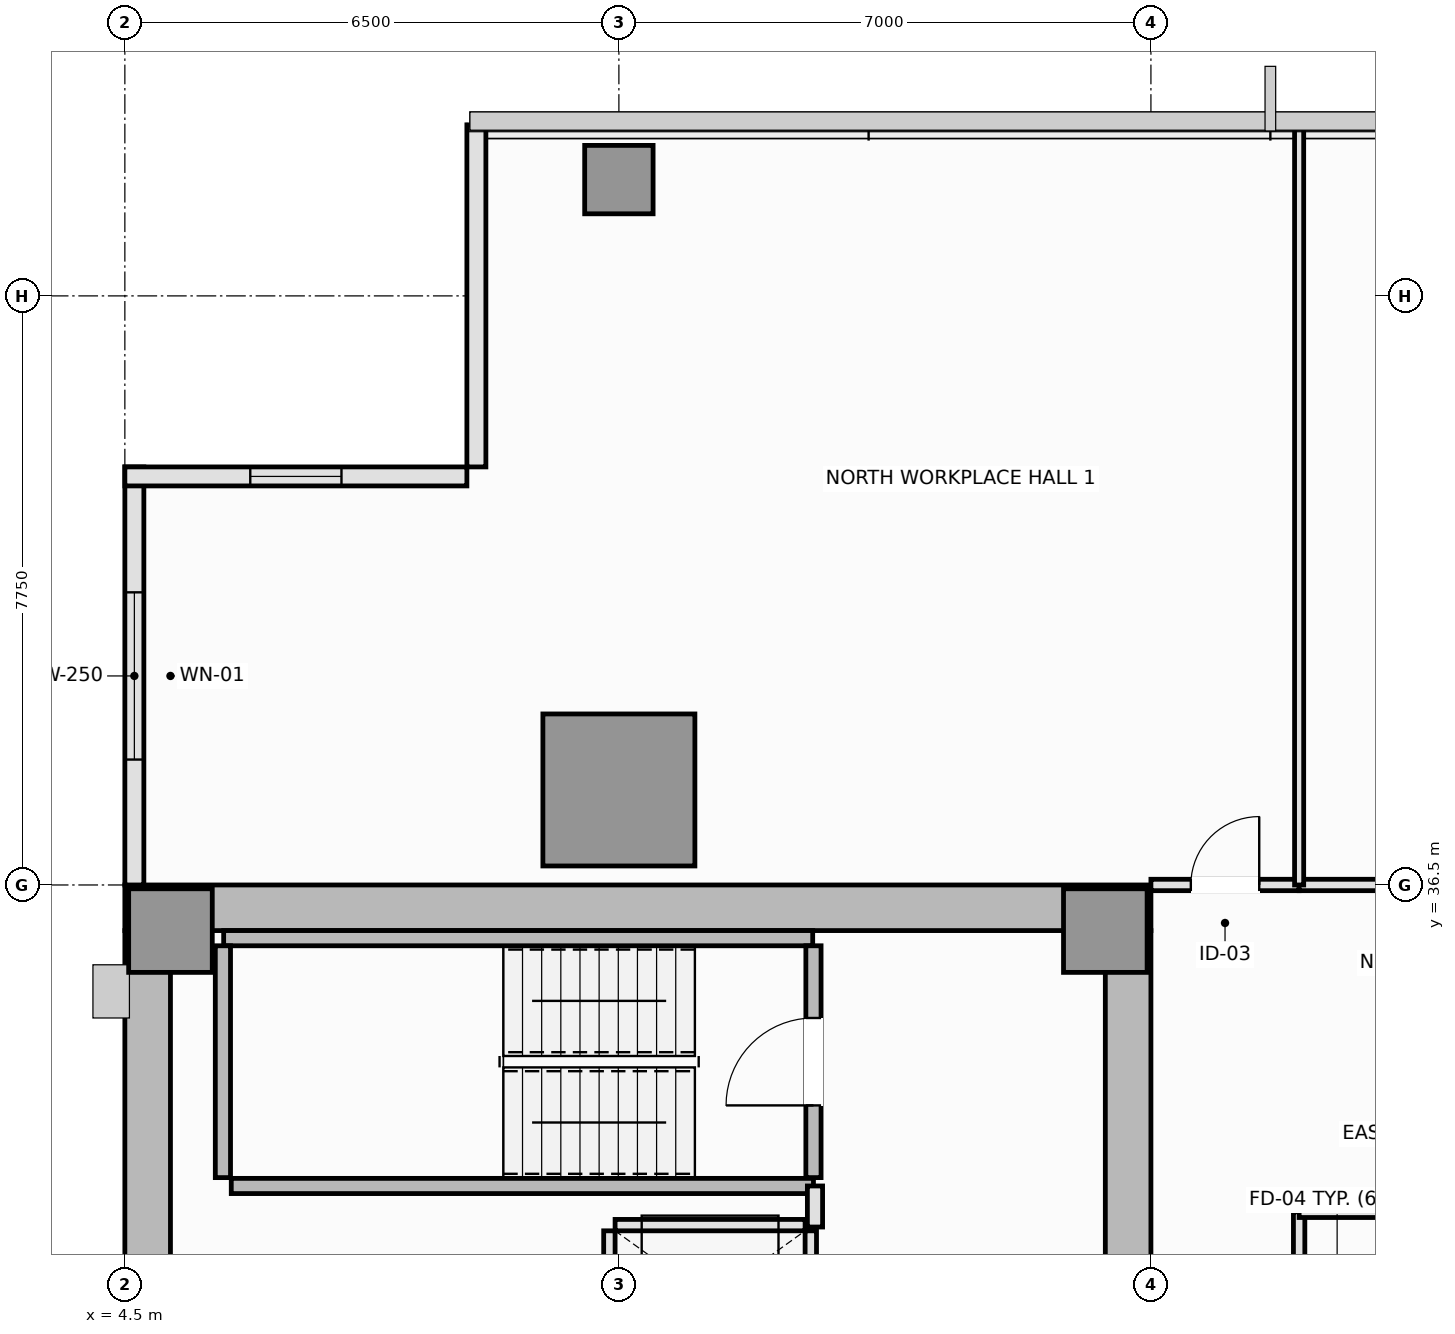
"""IFC4 building model, lengths in metres.
Left out: names, types, materials, properties, quantities, classifications, styles, units other than length and angle.
Written with IfcOpenShell. Run it as: python <this file> out.ifc"""

import sys

from ifc_helpers import new_model, si_unit, direction, frame, frame_2d, origin, origin_2d, place, context, subcontext, project, spatial, rectangle, extrude, element, fill, save


model = new_model("IFC4")
c1 = context("Model", 3, precision=1e-05, world=origin(), true_north=direction((0.0, 1.0)))
c2 = subcontext(c1, "Body", "Model", "MODEL_VIEW")
j1 = project(units=[si_unit("LENGTHUNIT", "METRE"), si_unit("PLANEANGLEUNIT", "RADIAN")], contexts=[c1])
p1 = place(None, origin())
s1 = spatial("IfcSite", under=j1, at=p1, CompositionType="ELEMENT")
p2 = place(p1, origin())
s2 = spatial("IfcBuilding", under=s1, at=p2, CompositionType="ELEMENT")
p3 = place(p2, frame((0.0, 0.0, 116.45)))
s3 = spatial("IfcBuildingStorey", under=s2, at=p3, CompositionType="ELEMENT", Elevation=116.45)
p4 = place(p3, frame((4.5, 36.2, 0.0), z_axis=(0.0, 0.0, 1.0), x_axis=(1.0, 0.0, 0.0)))
e1 = element("IfcWall", 1, at=p4, inside=s3, PredefinedType="SHEAR", context=c2, shape_type="SweptSolid", body=[
    extrude(rectangle(XDim=13.5, YDim=0.6, at=frame_2d((6.75, 0.0))), origin(), (0.0, 0.0, 1.0), 3.55),
])
p5 = place(p3, frame((4.8, 14.6, 0.0), z_axis=(0.0, 0.0, 1.0), x_axis=(0.0, 1.0, 0.0)))
e2 = element("IfcWall", 2, at=p5, inside=s3, PredefinedType="SHEAR", context=c2, shape_type="SweptSolid", body=[
    extrude(rectangle(XDim=21.3, YDim=0.6, at=frame_2d((10.65, 0.0))), origin(), (0.0, 0.0, 1.0), 3.55),
])
p6 = place(p3, frame((17.7, 27.05, 0.0), z_axis=(0.0, 0.0, 1.0), x_axis=(0.0, 1.0, 0.0)))
e3 = element("IfcWall", 3, at=p6, inside=s3, PredefinedType="SHEAR", context=c2, shape_type="SweptSolid", body=[
    extrude(rectangle(XDim=8.85, YDim=0.6, at=frame_2d((4.425, 0.0))), origin(), (0.0, 0.0, 1.0), 3.55),
])
p7 = place(p6, frame((3.45, 0.0, 0.0)))
e4 = element("IfcOpeningElement", 4, at=p7, cuts=e3, PredefinedType="OPENING", context=c2, shape_type="SweptSolid", body=[
    extrude(rectangle(XDim=1.1, YDim=2.15, at=frame_2d((0.55, 1.075))), frame((0.0, 0.31, 0.0), z_axis=(0.0, -1.0, 0.0), x_axis=(1.0, 0.0, 0.0)), (0.0, 0.0, 1.0), 0.62),
])
for number, where, z_axis, x_axis in (
    (5, (5.1, 35.9, 0.0), (0.0, 0.0, 1.0), (1.0, 0.0, 0.0)),
    (6, (17.4, 35.9, 0.0), (0.0, 0.0, 1.0), (1.0, 0.0, 0.0)),
):
    element("IfcColumn", number, at=place(p3, frame(where, z_axis=z_axis, x_axis=x_axis)), inside=s3, PredefinedType="PILASTER", context=c2, shape_type="SweptSolid", body=[
        extrude(rectangle(XDim=1.1, YDim=1.1, at=origin_2d()), origin(), (0.0, 0.0, 1.0), 3.55),
    ])
p8 = place(p3, frame((11.0, 37.75, 0.0), z_axis=(0.0, 0.0, 1.0), x_axis=(1.0, 0.0, 0.0)))
e7 = element("IfcColumn", 7, at=p8, inside=s3, PredefinedType="COLUMN", context=c2, shape_type="SweptSolid", body=[
    extrude(rectangle(XDim=2.0, YDim=2.0, at=origin_2d()), origin(), (0.0, 0.0, 1.0), 3.55),
])
p9 = place(p3, frame((11.0, 45.78, 0.0), z_axis=(0.0, 0.0, 1.0), x_axis=(1.0, 0.0, 0.0)))
e8 = element("IfcColumn", 8, at=p9, inside=s3, PredefinedType="COLUMN", context=c2, shape_type="SweptSolid", body=[
    extrude(rectangle(XDim=0.9, YDim=0.9, at=origin_2d()), origin(), (0.0, 0.0, 1.0), 3.55),
])
p10 = place(p3, frame((4.625, 42.0, 0.0), z_axis=(0.0, 0.0, 1.0), x_axis=(0.0, -1.0, 0.0)))
e9 = element("IfcWall", 9, at=p10, inside=s3, PredefinedType="SOLIDWALL", context=c2, shape_type="SweptSolid", body=[
    extrude(rectangle(XDim=5.5, YDim=0.25, at=frame_2d((2.75, 0.0))), origin(), (0.0, 0.0, 1.0), 3.37),
])
p11 = place(p10, frame((1.65, 0.0, 0.9)))
e10 = element("IfcOpeningElement", 10, at=p11, cuts=e9, PredefinedType="OPENING", context=c2, shape_type="SweptSolid", body=[
    extrude(rectangle(XDim=2.2, YDim=1.8, at=frame_2d((1.1, 0.9))), frame((0.0, 0.135, 0.0), z_axis=(0.0, -1.0, 0.0), x_axis=(1.0, 0.0, 0.0)), (0.0, 0.0, 1.0), 0.27),
])
p12 = place(p3, frame((9.125, 46.5, 0.0), z_axis=(0.0, 0.0, 1.0), x_axis=(0.0, -1.0, 0.0)))
e11 = element("IfcWall", 11, at=p12, inside=s3, PredefinedType="SOLIDWALL", context=c2, shape_type="SweptSolid", body=[
    extrude(rectangle(XDim=4.5, YDim=0.25, at=frame_2d((2.25, 0.0))), origin(), (0.0, 0.0, 1.0), 3.37),
])
p13 = place(p3, frame((9.0, 41.875, 0.0), z_axis=(0.0, 0.0, 1.0), x_axis=(-1.0, 0.0, 0.0)))
e12 = element("IfcWall", 12, at=p13, inside=s3, PredefinedType="SOLIDWALL", context=c2, shape_type="SweptSolid", body=[
    extrude(rectangle(XDim=4.5, YDim=0.25, at=frame_2d((2.25, 0.0))), origin(), (0.0, 0.0, 1.0), 3.37),
])
p14 = place(p13, frame((1.65, 0.0, 0.9)))
e13 = element("IfcOpeningElement", 13, at=p14, cuts=e12, PredefinedType="OPENING", context=c2, shape_type="SweptSolid", body=[
    extrude(rectangle(XDim=1.2, YDim=1.8, at=frame_2d((0.6, 0.9))), frame((0.0, 0.135, 0.0), z_axis=(0.0, -1.0, 0.0), x_axis=(1.0, 0.0, 0.0)), (0.0, 0.0, 1.0), 0.27),
])
p15 = place(p3, frame((5.8, 35.8, 0.0), z_axis=(0.0, 0.0, 1.0), x_axis=(1.0, 0.0, 0.0)))
e14 = element("IfcWall", 14, at=p15, inside=s3, PredefinedType="SOLIDWALL", context=c2, shape_type="SweptSolid", body=[
    extrude(rectangle(XDim=7.75, YDim=0.2, at=frame_2d((3.875, 0.0))), origin(), (0.0, 0.0, 1.0), 3.55),
])
p16 = place(p3, frame((5.79, 32.65, 0.0), z_axis=(0.0, 0.0, 1.0), x_axis=(0.0, 1.0, 0.0)))
e15 = element("IfcWall", 15, at=p16, inside=s3, PredefinedType="SOLIDWALL", context=c2, shape_type="SweptSolid", body=[
    extrude(rectangle(XDim=3.05, YDim=0.2, at=frame_2d((1.525, 0.0))), origin(), (0.0, 0.0, 1.0), 3.55),
])
p17 = place(p3, frame((5.9, 32.54, 0.0), z_axis=(0.0, 0.0, 1.0), x_axis=(1.0, 0.0, 0.0)))
e16 = element("IfcWall", 16, at=p17, inside=s3, PredefinedType="SOLIDWALL", context=c2, shape_type="SweptSolid", body=[
    extrude(rectangle(XDim=7.66, YDim=0.2, at=frame_2d((3.83, 0.0))), origin(), (0.0, 0.0, 1.0), 3.55),
])
p18 = place(p3, frame((13.56, 32.65, 0.0), z_axis=(0.0, 0.0, 1.0), x_axis=(0.0, 1.0, 0.0)))
e17 = element("IfcWall", 17, at=p18, inside=s3, PredefinedType="SOLIDWALL", context=c2, shape_type="SweptSolid", body=[
    extrude(rectangle(XDim=3.05, YDim=0.2, at=frame_2d((1.525, 0.0))), origin(), (0.0, 0.0, 1.0), 3.55),
])
p19 = place(p18, frame((0.95, 0.0, 0.0)))
e18 = element("IfcOpeningElement", 18, at=p19, cuts=e17, PredefinedType="OPENING", context=c2, shape_type="SweptSolid", body=[
    extrude(rectangle(XDim=1.15, YDim=2.15, at=frame_2d((0.575, 1.075))), frame((0.0, 0.11, 0.0), z_axis=(0.0, -1.0, 0.0), x_axis=(1.0, 0.0, 0.0)), (0.0, 0.0, 1.0), 0.22),
])
p20 = place(p3, frame((10.95, 32.025, 0.0), z_axis=(0.0, 0.0, 1.0), x_axis=(1.0, 0.0, 0.0)))
e19 = element("IfcWall", 19, at=p20, inside=s3, PredefinedType="PARTITIONING", context=c2, shape_type="SweptSolid", body=[
    extrude(rectangle(XDim=2.5, YDim=0.15, at=frame_2d((1.25, 0.0))), origin(), (0.0, 0.0, 1.0), 3.37),
])
p21 = place(p3, frame((10.875, 30.15, 0.0), z_axis=(0.0, 0.0, 1.0), x_axis=(0.0, 1.0, 0.0)))
e20 = element("IfcWall", 20, at=p21, inside=s3, PredefinedType="PARTITIONING", context=c2, shape_type="SweptSolid", body=[
    extrude(rectangle(XDim=1.8, YDim=0.15, at=frame_2d((0.9, 0.0))), origin(), (0.0, 0.0, 1.0), 3.37),
])
p22 = place(p3, frame((13.525, 30.15, 0.0), z_axis=(0.0, 0.0, 1.0), x_axis=(0.0, 1.0, 0.0)))
e21 = element("IfcWall", 21, at=p22, inside=s3, PredefinedType="PARTITIONING", context=c2, shape_type="SweptSolid", body=[
    extrude(rectangle(XDim=1.8, YDim=0.15, at=frame_2d((0.9, 0.0))), origin(), (0.0, 0.0, 1.0), 3.37),
])
p23 = place(p22, frame((0.35, 0.0, 0.0)))
e22 = element("IfcOpeningElement", 22, at=p23, cuts=e21, PredefinedType="OPENING", context=c2, shape_type="SweptSolid", body=[
    extrude(rectangle(XDim=1.1, YDim=2.2, at=frame_2d((0.55, 1.1))), frame((0.0, 0.085, 0.0), z_axis=(0.0, -1.0, 0.0), x_axis=(1.0, 0.0, 0.0)), (0.0, 0.0, 1.0), 0.17),
])
p24 = place(p3, frame((13.58, 32.0, 0.0), z_axis=(0.0, 0.0, 1.0), x_axis=(0.0, 1.0, 0.0)))
e23 = element("IfcWall", 23, at=p24, inside=s3, PredefinedType="PARTITIONING", context=c2, shape_type="SweptSolid", body=[
    extrude(rectangle(XDim=0.54, YDim=0.2, at=frame_2d((0.27, 0.0))), origin(), (0.0, 0.0, 1.0), 3.37),
])
p25 = place(p3, frame((19.95, 29.2, 0.0), z_axis=(0.0, 0.0, 1.0), x_axis=(0.0, 1.0, 0.0)))
e24 = element("IfcWall", 24, at=p25, inside=s3, PredefinedType="PLUMBINGWALL", context=c2, shape_type="SweptSolid", body=[
    extrude(rectangle(XDim=3.0, YDim=0.15, at=frame_2d((1.5, 0.0))), origin(), (0.0, 0.0, 1.0), 3.37),
])
p26 = place(p25, frame((1.05, 0.0, 0.0)))
e25 = element("IfcOpeningElement", 25, at=p26, cuts=e24, PredefinedType="OPENING", context=c2, shape_type="SweptSolid", body=[
    extrude(rectangle(XDim=0.9, YDim=2.1, at=frame_2d((0.45, 1.05))), frame((0.0, 0.085, 0.0), z_axis=(0.0, -1.0, 0.0), x_axis=(1.0, 0.0, 0.0)), (0.0, 0.0, 1.0), 0.17),
])
p27 = place(p3, frame((18.0, 36.5, 0.0), z_axis=(0.0, 0.0, 1.0), x_axis=(1.0, 0.0, 0.0)))
e26 = element("IfcWall", 26, at=p27, inside=s3, PredefinedType="PARTITIONING", context=c2, shape_type="SweptSolid", body=[
    extrude(rectangle(XDim=1.95, YDim=0.15, at=frame_2d((0.975, 0.0))), origin(), (0.0, 0.0, 1.0), 3.37),
])
p28 = place(p27, frame((0.525, 0.0, 0.0)))
e27 = element("IfcOpeningElement", 27, at=p28, cuts=e26, PredefinedType="OPENING", context=c2, shape_type="SweptSolid", body=[
    extrude(rectangle(XDim=0.9, YDim=2.1, at=frame_2d((0.45, 1.05))), frame((0.0, 0.085, 0.0), z_axis=(0.0, -1.0, 0.0), x_axis=(1.0, 0.0, 0.0)), (0.0, 0.0, 1.0), 0.17),
])
p29 = place(p3, frame((19.95, 32.2, 0.0), z_axis=(0.0, 0.0, 1.0), x_axis=(1.0, 0.0, 0.0)))
e28 = element("IfcWall", 28, at=p29, inside=s3, PredefinedType="PLUMBINGWALL", context=c2, shape_type="SweptSolid", body=[
    extrude(rectangle(XDim=3.25, YDim=0.15, at=frame_2d((1.625, 0.0))), origin(), (0.0, 0.0, 1.0), 3.37),
])
p30 = place(p3, frame((19.95, 36.5, 0.0), z_axis=(0.0, 0.0, 1.0), x_axis=(1.0, 0.0, 0.0)))
e29 = element("IfcWall", 29, at=p30, inside=s3, PredefinedType="PARTITIONING", context=c2, shape_type="SweptSolid", body=[
    extrude(rectangle(XDim=7.55, YDim=0.15, at=frame_2d((3.775, 0.0))), origin(), (0.0, 0.0, 1.0), 3.37),
])
p31 = place(p30, frame((3.275, 0.0, 0.0)))
e30 = element("IfcOpeningElement", 30, at=p31, cuts=e29, PredefinedType="OPENING", context=c2, shape_type="SweptSolid", body=[
    extrude(rectangle(XDim=1.0, YDim=2.15, at=frame_2d((0.5, 1.075))), frame((0.0, 0.085, 0.0), z_axis=(0.0, -1.0, 0.0), x_axis=(1.0, 0.0, 0.0)), (0.0, 0.0, 1.0), 0.17),
])
p32 = place(p3, frame((19.95, 36.5, 0.0), z_axis=(0.0, 0.0, 1.0), x_axis=(0.0, 1.0, 0.0)))
e31 = element("IfcWall", 31, at=p32, inside=s3, PredefinedType="PARTITIONING", context=c2, shape_type="SweptSolid", body=[
    extrude(rectangle(XDim=9.99, YDim=0.12, at=frame_2d((4.995, 0.0))), origin(), (0.0, 0.0, 1.0), 3.37),
])
p33 = place(p11, origin())
e32 = element("IfcWindow", 32, at=p33, inside=s3, PartitioningType="SINGLE_PANEL", PredefinedType="WINDOW", context=c2, shape_type="SweptSolid", body=[
    extrude(rectangle(XDim=2.2, YDim=1.8, at=frame_2d((1.1, 0.9))), frame((0.0, 0.03, 0.0), z_axis=(0.0, -1.0, 0.0), x_axis=(1.0, 0.0, 0.0)), (0.0, 0.0, 1.0), 0.06),
])
fill(e10, e32)
p34 = place(p14, origin())
e33 = element("IfcWindow", 33, at=p34, inside=s3, PartitioningType="SINGLE_PANEL", PredefinedType="WINDOW", context=c2, shape_type="SweptSolid", body=[
    extrude(rectangle(XDim=1.2, YDim=1.8, at=frame_2d((0.6, 0.9))), frame((0.0, 0.03, 0.0), z_axis=(0.0, -1.0, 0.0), x_axis=(1.0, 0.0, 0.0)), (0.0, 0.0, 1.0), 0.06),
])
fill(e13, e33)
p35 = place(p19, origin())
e34 = element("IfcDoor", 34, at=p35, inside=s3, OperationType="SINGLE_SWING_LEFT", PredefinedType="DOOR", context=c2, shape_type="SweptSolid", body=[
    extrude(rectangle(XDim=1.15, YDim=2.15, at=frame_2d((0.575, 1.075))), frame((0.0, 0.025, 0.0), z_axis=(0.0, -1.0, 0.0), x_axis=(1.0, 0.0, 0.0)), (0.0, 0.0, 1.0), 0.05),
])
fill(e18, e34)
p36 = place(p28, origin())
e35 = element("IfcDoor", 35, at=p36, inside=s3, OperationType="SINGLE_SWING_RIGHT", PredefinedType="DOOR", context=c2, shape_type="SweptSolid", body=[
    extrude(rectangle(XDim=0.9, YDim=2.1, at=frame_2d((0.45, 1.05))), frame((0.0, 0.025, 0.0), z_axis=(0.0, -1.0, 0.0), x_axis=(1.0, 0.0, 0.0)), (0.0, 0.0, 1.0), 0.05),
])
fill(e27, e35)
save(model, sys.argv[1])
